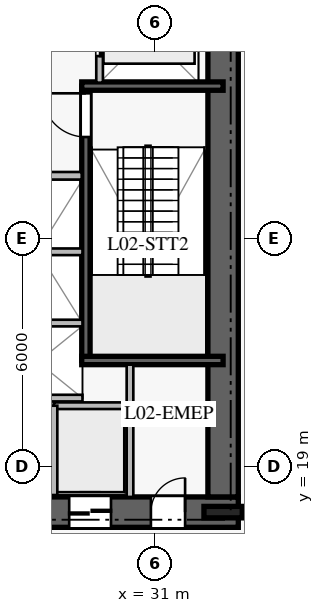
"""IFC4 building model, lengths in metres.
Left out: names, types, materials, properties, quantities, classifications, styles, units other than length and angle.
Written with IfcOpenShell. Run it as: python <this file> out.ifc"""

import sys

from ifc_helpers import new_model, si_unit, direction, frame, frame_2d, origin, origin_2d, place, context, subcontext, project, spatial, rectangle, i_section, extrude, element, fill, save


model = new_model("IFC4")
c1 = context("Model", 3, precision=1e-05, world=origin(), true_north=direction((0.0, 1.0)))
c2 = subcontext(c1, "Body", "Model", "MODEL_VIEW")
j1 = project(units=[si_unit("LENGTHUNIT", "METRE"), si_unit("PLANEANGLEUNIT", "RADIAN")], contexts=[c1])
p1 = place(None, origin())
s1 = spatial("IfcSite", under=j1, at=p1, CompositionType="ELEMENT")
p2 = place(p1, origin())
s2 = spatial("IfcBuilding", under=s1, at=p2, CompositionType="ELEMENT")
p3 = place(p2, frame((0.0, 0.0, 9.8)))
s3 = spatial("IfcBuildingStorey", under=s2, at=p3, CompositionType="ELEMENT", Elevation=9.8)
p4 = place(p3, frame((16.8, 17.8, 0.0), z_axis=(0.0, 0.0, 1.0), x_axis=(1.0, 0.0, 0.0)))
e1 = element("IfcWall", 1, at=p4, inside=s3, PredefinedType="SHEAR", context=c2, shape_type="SweptSolid", body=[
    extrude(rectangle(XDim=16.4, YDim=0.8, at=frame_2d((8.2, 0.0))), origin(), (0.0, 0.0, 1.0), 4.34),
])
p5 = place(p4, frame((5.15, 0.0, 0.0)))
e2 = element("IfcOpeningElement", 2, at=p5, cuts=e1, PredefinedType="OPENING", context=c2, shape_type="SweptSolid", body=[
    extrude(rectangle(XDim=1.2, YDim=2.25, at=frame_2d((0.6, 1.125))), frame((0.0, 0.41, 0.0), z_axis=(0.0, -1.0, 0.0), x_axis=(1.0, 0.0, 0.0)), (0.0, 0.0, 1.0), 0.82),
])
p6 = place(p4, frame((14.1, 0.0, 0.0)))
e3 = element("IfcOpeningElement", 3, at=p6, cuts=e1, PredefinedType="OPENING", context=c2, shape_type="SweptSolid", body=[
    extrude(rectangle(XDim=0.9, YDim=2.1, at=frame_2d((0.45, 1.05))), frame((0.0, 0.41, 0.0), z_axis=(0.0, -1.0, 0.0), x_axis=(1.0, 0.0, 0.0)), (0.0, 0.0, 1.0), 0.82),
])
p7 = place(p4, frame((8.0, 0.0, 0.0)))
e4 = element("IfcOpeningElement", 4, at=p7, cuts=e1, PredefinedType="OPENING", context=c2, shape_type="SweptSolid", body=[
    extrude(rectangle(XDim=1.1, YDim=2.2, at=frame_2d((0.55, 1.1))), frame((0.0, 0.41, 0.0), z_axis=(0.0, -1.0, 0.0), x_axis=(1.0, 0.0, 0.0)), (0.0, 0.0, 1.0), 0.82),
])
p8 = place(p4, frame((9.975, 0.0, 0.0)))
e5 = element("IfcOpeningElement", 5, at=p8, cuts=e1, PredefinedType="OPENING", context=c2, shape_type="SweptSolid", body=[
    extrude(rectangle(XDim=1.1, YDim=2.2, at=frame_2d((0.55, 1.1))), frame((0.0, 0.41, 0.0), z_axis=(0.0, -1.0, 0.0), x_axis=(1.0, 0.0, 0.0)), (0.0, 0.0, 1.0), 0.82),
])
p9 = place(p4, frame((11.95, 0.0, 0.0)))
e6 = element("IfcOpeningElement", 6, at=p9, cuts=e1, PredefinedType="OPENING", context=c2, shape_type="SweptSolid", body=[
    extrude(rectangle(XDim=1.1, YDim=2.2, at=frame_2d((0.55, 1.1))), frame((0.0, 0.41, 0.0), z_axis=(0.0, -1.0, 0.0), x_axis=(1.0, 0.0, 0.0)), (0.0, 0.0, 1.0), 0.82),
])
p10 = place(p3, frame((32.8, 18.2, 0.0), z_axis=(0.0, 0.0, 1.0), x_axis=(0.0, 1.0, 0.0)))
e7 = element("IfcWall", 7, at=p10, inside=s3, PredefinedType="SHEAR", context=c2, shape_type="SweptSolid", body=[
    extrude(rectangle(XDim=13.6, YDim=0.8, at=frame_2d((6.8, 0.0))), origin(), (0.0, 0.0, 1.0), 4.34),
])
p11 = place(p3, frame((32.8, 17.8, 0.0), z_axis=(0.0, 0.0, 1.0), x_axis=(1.0, 0.0, 0.0)))
e8 = element("IfcColumn", 8, at=p11, inside=s3, PredefinedType="COLUMN", context=c2, shape_type="SweptSolid", body=[
    extrude(i_section(OverallWidth=0.302, OverallDepth=1.008, WebThickness=0.021, FlangeThickness=0.04, at=origin_2d()), origin(), (0.0, 0.0, 1.0), 4.6),
])
p12 = place(p3, frame((29.19, 21.79, 0.0), z_axis=(0.0, 0.0, 1.0), x_axis=(0.0, 1.0, 0.0)))
e9 = element("IfcWall", 9, at=p12, inside=s3, PredefinedType="SOLIDWALL", context=c2, shape_type="SweptSolid", body=[
    extrude(rectangle(XDim=7.22, YDim=0.22, at=frame_2d((3.61, 0.0))), origin(), (0.0, 0.0, 1.0), 4.34),
])
p13 = place(p12, frame((5.88, 0.0, 0.0)))
e10 = element("IfcOpeningElement", 10, at=p13, cuts=e9, PredefinedType="OPENING", context=c2, shape_type="SweptSolid", body=[
    extrude(rectangle(XDim=1.15, YDim=2.2, at=frame_2d((0.575, 1.1))), frame((0.0, 0.12, 0.0), z_axis=(0.0, -1.0, 0.0), x_axis=(1.0, 0.0, 0.0)), (0.0, 0.0, 1.0), 0.24),
])
for number, where, z_axis, x_axis in (
    (11, (29.08, 21.79, 0.0), (0.0, 0.0, 1.0), (1.0, 0.0, 0.0)),
    (12, (29.08, 29.01, 0.0), (0.0, 0.0, 1.0), (1.0, 0.0, 0.0)),
):
    element("IfcWall", number, at=place(p3, frame(where, z_axis=z_axis, x_axis=x_axis)), inside=s3, PredefinedType="SOLIDWALL", context=c2, shape_type="SweptSolid", body=[
        extrude(rectangle(XDim=3.72, YDim=0.22, at=frame_2d((1.86, 0.0))), origin(), (0.0, 0.0, 1.0), 4.34),
    ])
p14 = place(p3, frame((25.7, 26.65, 0.0), z_axis=(0.0, 0.0, 1.0), x_axis=(1.0, 0.0, 0.0)))
e13 = element("IfcWall", 13, at=p14, inside=s3, PredefinedType="PARTITIONING", context=c2, shape_type="SweptSolid", body=[
    extrude(rectangle(XDim=3.38, YDim=0.2, at=frame_2d((1.69, 0.0))), origin(), (0.0, 0.0, 1.0), 4.34),
])
p15 = place(p3, frame((30.35, 18.2, 0.0), z_axis=(0.0, 0.0, 1.0), x_axis=(0.0, 1.0, 0.0)))
e14 = element("IfcWall", 14, at=p15, inside=s3, PredefinedType="PARTITIONING", context=c2, shape_type="SweptSolid", body=[
    extrude(rectangle(XDim=3.48, YDim=0.175, at=frame_2d((1.74, 0.0))), origin(), (0.0, 0.0, 1.0), 4.34),
])
p16 = place(p3, frame((28.35, 20.6, 0.0), z_axis=(0.0, 0.0, 1.0), x_axis=(1.0, 0.0, 0.0)))
e15 = element("IfcWall", 15, at=p16, inside=s3, PredefinedType="PARTITIONING", context=c2, shape_type="SweptSolid", body=[
    extrude(rectangle(XDim=1.9, YDim=0.175, at=frame_2d((0.95, 0.0))), origin(), (0.0, 0.0, 1.0), 4.34),
])
for number, where, z_axis, x_axis in (
    (16, (28.35, 18.25, 0.0), (0.0, 0.0, 1.0), (0.0, 1.0, 0.0)),
    (17, (26.75, 20.8, 0.0), (0.0, 0.0, 1.0), (1.0, 0.0, 0.0)),
    (18, (26.75, 22.775, 0.0), (0.0, 0.0, 1.0), (1.0, 0.0, 0.0)),
    (19, (26.75, 24.65, 0.0), (0.0, 0.0, 1.0), (1.0, 0.0, 0.0)),
):
    element("IfcWall", number, at=place(p3, frame(where, z_axis=z_axis, x_axis=x_axis)), inside=s3, PredefinedType="PARTITIONING", context=c2, shape_type="SweptSolid", body=[
        extrude(rectangle(XDim=2.35, YDim=0.175, at=frame_2d((1.175, 0.0))), origin(), (0.0, 0.0, 1.0), 4.34),
    ])
p17 = place(p3, frame((29.55, 29.1, 0.0), z_axis=(0.0, 0.0, 1.0), x_axis=(0.0, 1.0, 0.0)))
e20 = element("IfcWall", 20, at=p17, inside=s3, PredefinedType="PARTITIONING", context=c2, shape_type="SweptSolid", body=[
    extrude(rectangle(XDim=2.6, YDim=0.175, at=frame_2d((1.3, 0.0))), origin(), (0.0, 0.0, 1.0), 4.34),
])
p18 = place(p17, frame((0.7, 0.0, 0.0)))
e21 = element("IfcOpeningElement", 21, at=p18, cuts=e20, PredefinedType="OPENING", context=c2, shape_type="SweptSolid", body=[
    extrude(rectangle(XDim=1.2, YDim=2.2, at=frame_2d((0.6, 1.1))), frame((0.0, 0.098, 0.0), z_axis=(0.0, -1.0, 0.0), x_axis=(1.0, 0.0, 0.0)), (0.0, 0.0, 1.0), 0.195),
])
p19 = place(p13, origin())
e22 = element("IfcDoor", 22, at=p19, inside=s3, OperationType="SINGLE_SWING_RIGHT", PredefinedType="DOOR", context=c2, shape_type="SweptSolid", body=[
    extrude(rectangle(XDim=1.15, YDim=2.2, at=frame_2d((0.575, 1.1))), frame((0.0, 0.025, 0.0), z_axis=(0.0, -1.0, 0.0), x_axis=(1.0, 0.0, 0.0)), (0.0, 0.0, 1.0), 0.05),
])
fill(e10, e22)
p20 = place(p6, origin())
e23 = element("IfcDoor", 23, at=p20, inside=s3, OperationType="SINGLE_SWING_RIGHT", PredefinedType="DOOR", context=c2, shape_type="SweptSolid", body=[
    extrude(rectangle(XDim=0.9, YDim=2.1, at=frame_2d((0.45, 1.05))), frame((0.0, 0.025, 0.0), z_axis=(0.0, -1.0, 0.0), x_axis=(1.0, 0.0, 0.0)), (0.0, 0.0, 1.0), 0.05),
])
fill(e3, e23)
p21 = place(p9, origin())
e24 = element("IfcDoor", 24, at=p21, inside=s3, OperationType="DOUBLE_DOOR_SLIDING", PredefinedType="DOOR", context=c2, shape_type="SweptSolid", body=[
    extrude(rectangle(XDim=1.1, YDim=2.2, at=frame_2d((0.55, 1.1))), frame((0.0, 0.025, 0.0), z_axis=(0.0, -1.0, 0.0), x_axis=(1.0, 0.0, 0.0)), (0.0, 0.0, 1.0), 0.05),
])
fill(e6, e24)
p22 = place(p18, origin())
e25 = element("IfcDoor", 25, at=p22, inside=s3, OperationType="DOUBLE_DOOR_SLIDING", PredefinedType="DOOR", context=c2, shape_type="SweptSolid", body=[
    extrude(rectangle(XDim=1.2, YDim=2.2, at=frame_2d((0.6, 1.1))), frame((0.0, 0.025, 0.0), z_axis=(0.0, -1.0, 0.0), x_axis=(1.0, 0.0, 0.0)), (0.0, 0.0, 1.0), 0.05),
])
fill(e21, e25)
save(model, sys.argv[1])
